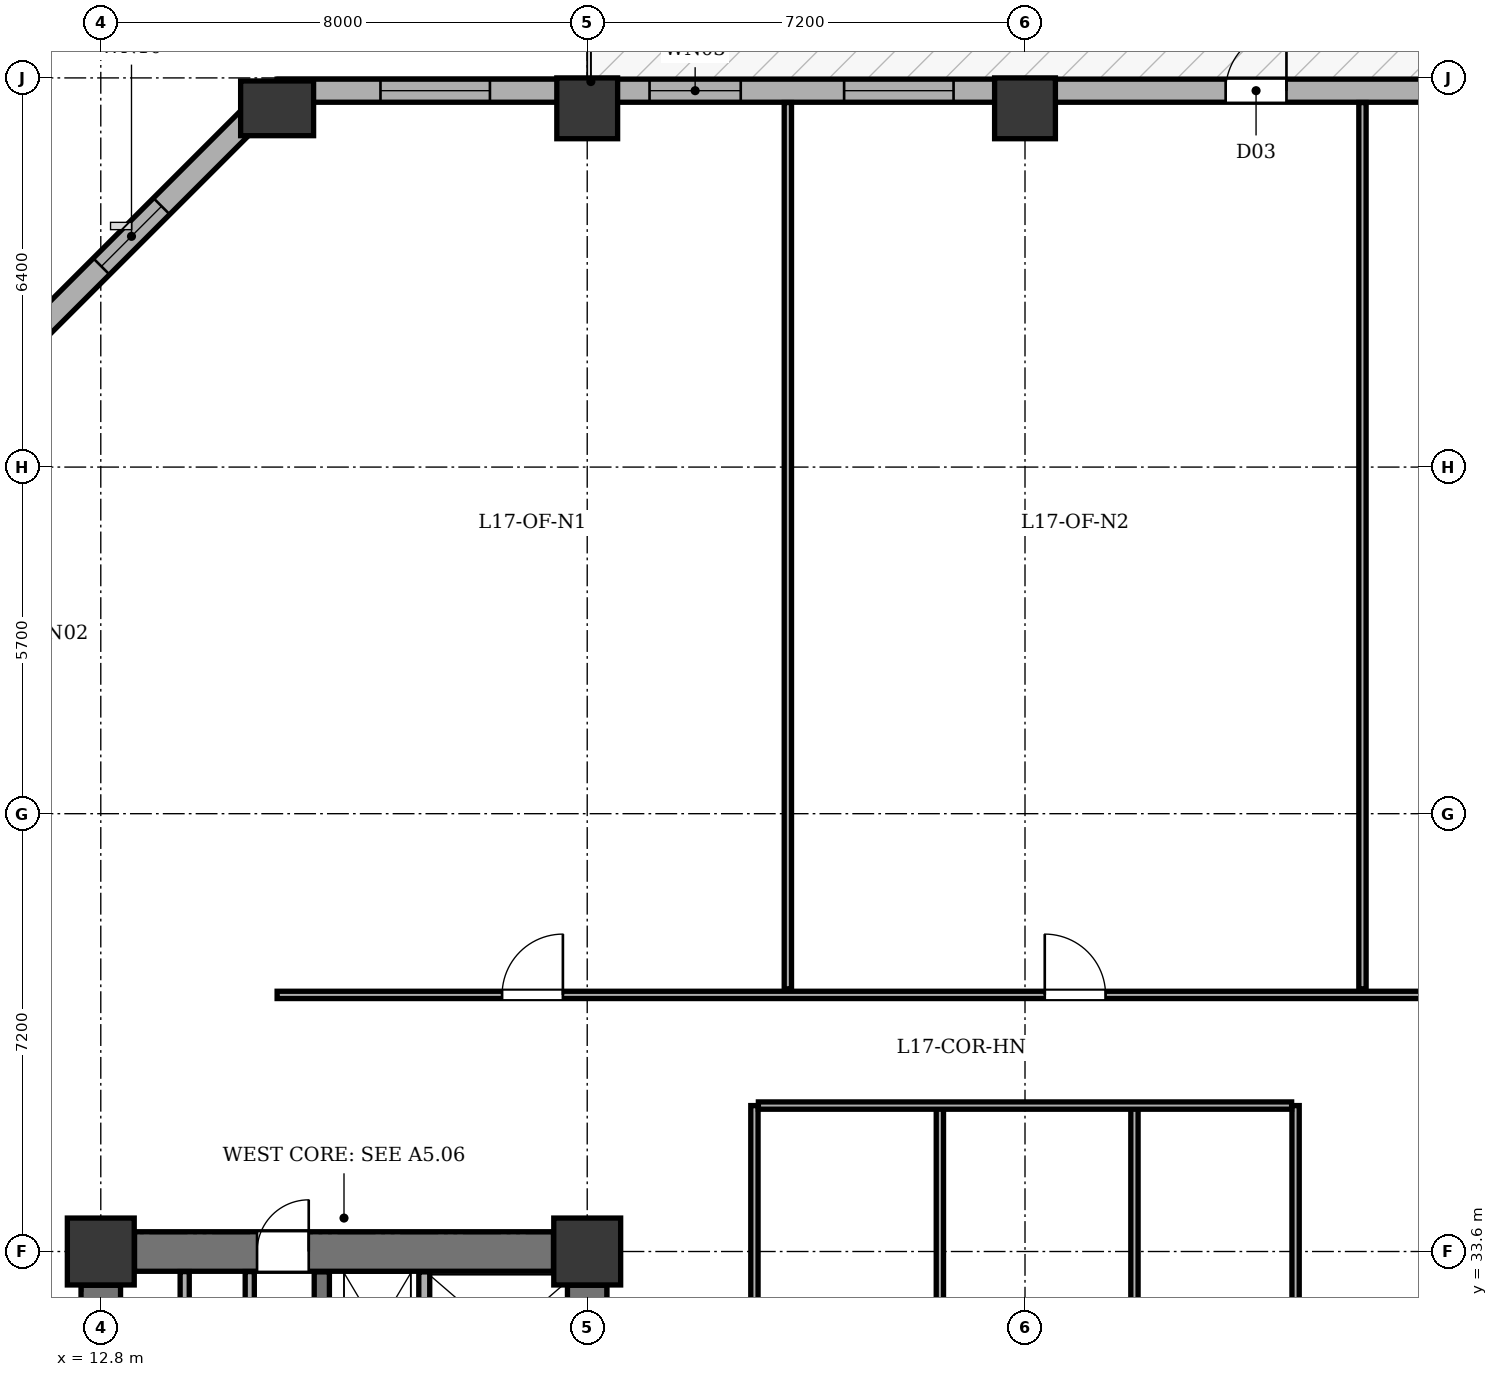
"""IFC4 building model, lengths in metres.
Left out: names, types, materials, properties, quantities, classifications, styles, units other than length and angle.
Written with IfcOpenShell. Run it as: python <this file> out.ifc"""

import sys

from ifc_helpers import new_model, si_unit, direction, frame, frame_2d, origin, origin_2d, place, context, subcontext, project, spatial, rectangle, extrude, element, fill, save


model = new_model("IFC4")
c1 = context("Model", 3, precision=1e-05, world=origin(), true_north=direction((0.0, 1.0)))
c2 = subcontext(c1, "Body", "Model", "MODEL_VIEW")
j1 = project(units=[si_unit("LENGTHUNIT", "METRE"), si_unit("PLANEANGLEUNIT", "RADIAN")], contexts=[c1])
p1 = place(None, origin())
s1 = spatial("IfcSite", under=j1, at=p1, CompositionType="ELEMENT")
p2 = place(p1, origin())
s2 = spatial("IfcBuilding", under=s1, at=p2, CompositionType="ELEMENT")
p3 = place(p2, frame((0.0, 0.0, 71.1)))
s3 = spatial("IfcBuildingStorey", under=s2, at=p3, CompositionType="ELEMENT", Elevation=71.1)
for number, where, z_axis, x_axis in (
    (1, (12.8, 33.6, 0.0), (0.0, 0.0, 1.0), (1.0, 0.0, 0.0)),
    (2, (20.8, 33.6, 0.0), (0.0, 0.0, 1.0), (1.0, 0.0, 0.0)),
):
    element("IfcColumn", number, at=place(p3, frame(where, z_axis=z_axis, x_axis=x_axis)), inside=s3, PredefinedType="COLUMN", context=c2, shape_type="SweptSolid", body=[
        extrude(rectangle(XDim=1.1, YDim=1.1, at=origin_2d()), origin(), (0.0, 0.0, 1.0), 3.9),
    ])
p4 = place(p3, frame((15.7, 52.4, 0.0), z_axis=(0.0, 0.0, 1.0), x_axis=(1.0, 0.0, 0.0)))
e3 = element("IfcColumn", 3, at=p4, inside=s3, PredefinedType="COLUMN", context=c2, shape_type="SweptSolid", body=[
    extrude(rectangle(XDim=0.9, YDim=1.2, at=origin_2d()), origin(), (0.0, 0.0, 1.0), 3.9),
])
for number, where, z_axis, x_axis in (
    (4, (20.8, 52.4, 0.0), (0.0, 0.0, 1.0), (1.0, 0.0, 0.0)),
    (5, (28.0, 52.4, 0.0), (0.0, 0.0, 1.0), (1.0, 0.0, 0.0)),
):
    element("IfcColumn", number, at=place(p3, frame(where, z_axis=z_axis, x_axis=x_axis)), inside=s3, PredefinedType="COLUMN", context=c2, shape_type="SweptSolid", body=[
        extrude(rectangle(XDim=1.0, YDim=1.0, at=origin_2d()), origin(), (0.0, 0.0, 1.0), 3.9),
    ])
p5 = place(p3, frame((10.91, 47.9, 0.0), z_axis=(0.0, 0.0, 1.0), x_axis=(0.707106781187, 0.707106781187, 0.0)))
e6 = element("IfcWall", 6, at=p5, inside=s3, PredefinedType="STANDARD", context=c2, shape_type="SweptSolid", body=[
    extrude(rectangle(XDim=6.774, YDim=0.38, at=frame_2d((3.387, 0.0))), origin(), (0.0, 0.0, 1.0), 3.135),
])
p6 = place(p5, frame((2.687, 0.0, 0.8)))
e7 = element("IfcOpeningElement", 7, at=p6, cuts=e6, PredefinedType="OPENING", context=c2, shape_type="SweptSolid", body=[
    extrude(rectangle(XDim=1.4, YDim=1.65, at=frame_2d((0.7, 0.825))), frame((0.0, 0.2, 0.0), z_axis=(0.0, -1.0, 0.0), x_axis=(1.0, 0.0, 0.0)), (0.0, 0.0, 1.0), 0.4),
])
p7 = place(p3, frame((15.7, 52.69, 0.0), z_axis=(0.0, 0.0, 1.0), x_axis=(1.0, 0.0, 0.0)))
e8 = element("IfcWall", 8, at=p7, inside=s3, PredefinedType="STANDARD", context=c2, shape_type="SweptSolid", body=[
    extrude(rectangle(XDim=35.0, YDim=0.38, at=frame_2d((17.5, 0.0))), origin(), (0.0, 0.0, 1.0), 3.135),
])
p8 = place(p7, frame((15.6, 0.0, 0.0)))
e9 = element("IfcOpeningElement", 9, at=p8, cuts=e8, PredefinedType="OPENING", context=c2, shape_type="SweptSolid", body=[
    extrude(rectangle(XDim=1.0, YDim=2.02, at=frame_2d((0.5, 1.01))), frame((0.0, 0.2, 0.0), z_axis=(0.0, -1.0, 0.0), x_axis=(1.0, 0.0, 0.0)), (0.0, 0.0, 1.0), 0.4),
])
p9 = place(p7, frame((1.7, 0.0, 0.8)))
e10 = element("IfcOpeningElement", 10, at=p9, cuts=e8, PredefinedType="OPENING", context=c2, shape_type="SweptSolid", body=[
    extrude(rectangle(XDim=1.8, YDim=1.9, at=frame_2d((0.9, 0.95))), frame((0.0, 0.2, 0.0), z_axis=(0.0, -1.0, 0.0), x_axis=(1.0, 0.0, 0.0)), (0.0, 0.0, 1.0), 0.4),
])
p10 = place(p7, frame((6.125, 0.0, 0.8)))
e11 = element("IfcOpeningElement", 11, at=p10, cuts=e8, PredefinedType="OPENING", context=c2, shape_type="SweptSolid", body=[
    extrude(rectangle(XDim=1.5, YDim=1.9, at=frame_2d((0.75, 0.95))), frame((0.0, 0.2, 0.0), z_axis=(0.0, -1.0, 0.0), x_axis=(1.0, 0.0, 0.0)), (0.0, 0.0, 1.0), 0.4),
])
p11 = place(p7, frame((9.325, 0.0, 0.8)))
e12 = element("IfcOpeningElement", 12, at=p11, cuts=e8, PredefinedType="OPENING", context=c2, shape_type="SweptSolid", body=[
    extrude(rectangle(XDim=1.8, YDim=1.9, at=frame_2d((0.9, 0.95))), frame((0.0, 0.2, 0.0), z_axis=(0.0, -1.0, 0.0), x_axis=(1.0, 0.0, 0.0)), (0.0, 0.0, 1.0), 0.4),
])
p12 = place(p7, frame((20.962, 0.0, 0.8)))
e13 = element("IfcOpeningElement", 13, at=p12, cuts=e8, PredefinedType="OPENING", context=c2, shape_type="SweptSolid", body=[
    extrude(rectangle(XDim=1.8, YDim=1.9, at=frame_2d((0.9, 0.95))), frame((0.0, 0.2, 0.0), z_axis=(0.0, -1.0, 0.0), x_axis=(1.0, 0.0, 0.0)), (0.0, 0.0, 1.0), 0.4),
])
p13 = place(p7, frame((23.938, 0.0, 0.8)))
e14 = element("IfcOpeningElement", 14, at=p13, cuts=e8, PredefinedType="OPENING", context=c2, shape_type="SweptSolid", body=[
    extrude(rectangle(XDim=1.8, YDim=1.9, at=frame_2d((0.9, 0.95))), frame((0.0, 0.2, 0.0), z_axis=(0.0, -1.0, 0.0), x_axis=(1.0, 0.0, 0.0)), (0.0, 0.0, 1.0), 0.4),
])
p14 = place(p7, frame((28.292, 0.0, 0.8)))
e15 = element("IfcOpeningElement", 15, at=p14, cuts=e8, PredefinedType="OPENING", context=c2, shape_type="SweptSolid", body=[
    extrude(rectangle(XDim=1.8, YDim=1.9, at=frame_2d((0.9, 0.95))), frame((0.0, 0.2, 0.0), z_axis=(0.0, -1.0, 0.0), x_axis=(1.0, 0.0, 0.0)), (0.0, 0.0, 1.0), 0.4),
])
p15 = place(p7, frame((31.508, 0.0, 0.8)))
e16 = element("IfcOpeningElement", 16, at=p15, cuts=e8, PredefinedType="OPENING", context=c2, shape_type="SweptSolid", body=[
    extrude(rectangle(XDim=1.8, YDim=1.9, at=frame_2d((0.9, 0.95))), frame((0.0, 0.2, 0.0), z_axis=(0.0, -1.0, 0.0), x_axis=(1.0, 0.0, 0.0)), (0.0, 0.0, 1.0), 0.4),
])
p16 = place(p3, frame((12.8, 21.355, 0.0), z_axis=(0.0, 0.0, 1.0), x_axis=(0.0, 1.0, 0.0)))
e17 = element("IfcWall", 17, at=p16, inside=s3, PredefinedType="SHEAR", context=c2, shape_type="SweptSolid", body=[
    extrude(rectangle(XDim=11.69, YDim=0.65, at=frame_2d((5.845, 0.0))), origin(), (0.0, 0.0, 1.0), 3.6),
])
p17 = place(p3, frame((13.355, 33.6, 0.0), z_axis=(0.0, 0.0, 1.0), x_axis=(1.0, 0.0, 0.0)))
e18 = element("IfcWall", 18, at=p17, inside=s3, PredefinedType="SHEAR", context=c2, shape_type="SweptSolid", body=[
    extrude(rectangle(XDim=6.89, YDim=0.65, at=frame_2d((3.445, 0.0))), origin(), (0.0, 0.0, 1.0), 3.6),
])
p18 = place(p17, frame((2.015, 0.0, 0.0)))
e19 = element("IfcOpeningElement", 19, at=p18, cuts=e18, PredefinedType="OPENING", context=c2, shape_type="SweptSolid", body=[
    extrude(rectangle(XDim=0.85, YDim=2.02, at=frame_2d((0.425, 1.01))), frame((0.0, 0.335, 0.0), z_axis=(0.0, -1.0, 0.0), x_axis=(1.0, 0.0, 0.0)), (0.0, 0.0, 1.0), 0.67),
])
p19 = place(p3, frame((20.8, 21.355, 0.0), z_axis=(0.0, 0.0, 1.0), x_axis=(0.0, 1.0, 0.0)))
e20 = element("IfcWall", 20, at=p19, inside=s3, PredefinedType="SHEAR", context=c2, shape_type="SweptSolid", body=[
    extrude(rectangle(XDim=11.69, YDim=0.65, at=frame_2d((5.845, 0.0))), origin(), (0.0, 0.0, 1.0), 3.6),
])
p20 = place(p19, frame((1.245, 0.0, 0.0)))
e21 = element("IfcOpeningElement", 21, at=p20, cuts=e20, PredefinedType="OPENING", context=c2, shape_type="SweptSolid", body=[
    extrude(rectangle(XDim=1.2, YDim=2.15, at=frame_2d((0.6, 1.075))), frame((0.0, 0.335, 0.0), z_axis=(0.0, -1.0, 0.0), x_axis=(1.0, 0.0, 0.0)), (0.0, 0.0, 1.0), 0.67),
])
p21 = place(p19, frame((4.245, 0.0, 0.0)))
e22 = element("IfcOpeningElement", 22, at=p21, cuts=e20, PredefinedType="OPENING", context=c2, shape_type="SweptSolid", body=[
    extrude(rectangle(XDim=1.1, YDim=2.1, at=frame_2d((0.55, 1.05))), frame((0.0, 0.335, 0.0), z_axis=(0.0, -1.0, 0.0), x_axis=(1.0, 0.0, 0.0)), (0.0, 0.0, 1.0), 0.67),
])
p22 = place(p19, frame((6.195, 0.0, 0.0)))
e23 = element("IfcOpeningElement", 23, at=p22, cuts=e20, PredefinedType="OPENING", context=c2, shape_type="SweptSolid", body=[
    extrude(rectangle(XDim=1.1, YDim=2.1, at=frame_2d((0.55, 1.05))), frame((0.0, 0.335, 0.0), z_axis=(0.0, -1.0, 0.0), x_axis=(1.0, 0.0, 0.0)), (0.0, 0.0, 1.0), 0.67),
])
p23 = place(p19, frame((8.145, 0.0, 0.0)))
e24 = element("IfcOpeningElement", 24, at=p23, cuts=e20, PredefinedType="OPENING", context=c2, shape_type="SweptSolid", body=[
    extrude(rectangle(XDim=1.1, YDim=2.1, at=frame_2d((0.55, 1.05))), frame((0.0, 0.335, 0.0), z_axis=(0.0, -1.0, 0.0), x_axis=(1.0, 0.0, 0.0)), (0.0, 0.0, 1.0), 0.67),
])
p24 = place(p3, frame((16.435, 21.135, 0.0), z_axis=(0.0, 0.0, 1.0), x_axis=(0.0, 1.0, 0.0)))
e25 = element("IfcWall", 25, at=p24, inside=s3, PredefinedType="SHEAR", context=c2, shape_type="SweptSolid", body=[
    extrude(rectangle(XDim=12.13, YDim=0.25, at=frame_2d((6.065, 0.0))), origin(), (0.0, 0.0, 1.0), 3.6),
])
p25 = place(p24, frame((0.515, 0.0, 0.0)))
e26 = element("IfcOpeningElement", 26, at=p25, cuts=e25, PredefinedType="OPENING", context=c2, shape_type="SweptSolid", body=[
    extrude(rectangle(XDim=1.2, YDim=2.15, at=frame_2d((0.6, 1.075))), frame((0.0, 0.135, 0.0), z_axis=(0.0, -1.0, 0.0), x_axis=(1.0, 0.0, 0.0)), (0.0, 0.0, 1.0), 0.27),
])
p26 = place(p24, frame((2.665, 0.0, 0.0)))
e27 = element("IfcOpeningElement", 27, at=p26, cuts=e25, PredefinedType="OPENING", context=c2, shape_type="SweptSolid", body=[
    extrude(rectangle(XDim=1.15, YDim=2.15, at=frame_2d((0.575, 1.075))), frame((0.0, 0.135, 0.0), z_axis=(0.0, -1.0, 0.0), x_axis=(1.0, 0.0, 0.0)), (0.0, 0.0, 1.0), 0.27),
])
p27 = place(p3, frame((18.12, 31.17, 0.0), z_axis=(0.0, 0.0, 1.0), x_axis=(0.0, 1.0, 0.0)))
e28 = element("IfcWall", 28, at=p27, inside=s3, PredefinedType="PARTITIONING", context=c2, shape_type="SweptSolid", body=[
    extrude(rectangle(XDim=2.095, YDim=0.18, at=frame_2d((1.047, 0.0))), origin(), (0.0, 0.0, 1.0), 3.6),
])
p28 = place(p3, frame((14.18, 30.96, 0.0), z_axis=(0.0, 0.0, 1.0), x_axis=(0.0, 1.0, 0.0)))
e29 = element("IfcWall", 29, at=p28, inside=s3, PredefinedType="PARTITIONING", context=c2, shape_type="SweptSolid", body=[
    extrude(rectangle(XDim=2.31, YDim=0.15, at=frame_2d((1.155, 0.0))), origin(), (0.0, 0.0, 1.0), 3.6),
])
p29 = place(p28, frame((0.47, 0.0, 0.0)))
e30 = element("IfcOpeningElement", 30, at=p29, cuts=e29, PredefinedType="OPENING", context=c2, shape_type="SweptSolid", body=[
    extrude(rectangle(XDim=0.85, YDim=2.02, at=frame_2d((0.425, 1.01))), frame((0.0, 0.085, 0.0), z_axis=(0.0, -1.0, 0.0), x_axis=(1.0, 0.0, 0.0)), (0.0, 0.0, 1.0), 0.17),
])
p30 = place(p3, frame((15.25, 30.96, 0.0), z_axis=(0.0, 0.0, 1.0), x_axis=(0.0, 1.0, 0.0)))
e31 = element("IfcWall", 31, at=p30, inside=s3, PredefinedType="PARTITIONING", context=c2, shape_type="SweptSolid", body=[
    extrude(rectangle(XDim=2.31, YDim=0.15, at=frame_2d((1.155, 0.0))), origin(), (0.0, 0.0, 1.0), 3.6),
])
p31 = place(p30, frame((0.47, 0.0, 0.0)))
e32 = element("IfcOpeningElement", 32, at=p31, cuts=e31, PredefinedType="OPENING", context=c2, shape_type="SweptSolid", body=[
    extrude(rectangle(XDim=0.85, YDim=2.02, at=frame_2d((0.425, 1.01))), frame((0.0, 0.085, 0.0), z_axis=(0.0, -1.0, 0.0), x_axis=(1.0, 0.0, 0.0)), (0.0, 0.0, 1.0), 0.17),
])
for number, where, z_axis, x_axis in (
    (33, (23.55, 24.715, 0.0), (0.0, 0.0, 1.0), (0.0, 1.0, 0.0)),
    (34, (32.45, 24.715, 0.0), (0.0, 0.0, 1.0), (0.0, 1.0, 0.0)),
    (35, (26.6, 24.715, 0.0), (0.0, 0.0, 1.0), (0.0, 1.0, 0.0)),
):
    element("IfcWall", number, at=place(p3, frame(where, z_axis=z_axis, x_axis=x_axis)), inside=s3, PredefinedType="PARTITIONING", context=c2, shape_type="SweptSolid", body=[
        extrude(rectangle(XDim=11.285, YDim=0.12, at=frame_2d((5.643, 0.0))), origin(), (0.0, 0.0, 1.0), 3.6),
    ])
p32 = place(p3, frame((29.8, 24.715, 0.0), z_axis=(0.0, 0.0, 1.0), x_axis=(0.0, 1.0, 0.0)))
e36 = element("IfcWall", 36, at=p32, inside=s3, PredefinedType="PARTITIONING", context=c2, shape_type="SweptSolid", body=[
    extrude(rectangle(XDim=11.285, YDim=0.12, at=frame_2d((5.643, 0.0))), origin(), (0.0, 0.0, 1.0), 3.135),
])
p33 = place(p3, frame((23.615, 36.0, 0.0), z_axis=(0.0, 0.0, 1.0), x_axis=(1.0, 0.0, 0.0)))
e37 = element("IfcWall", 37, at=p33, inside=s3, PredefinedType="PARTITIONING", context=c2, shape_type="SweptSolid", body=[
    extrude(rectangle(XDim=8.77, YDim=0.12, at=frame_2d((4.385, 0.0))), origin(), (0.0, 0.0, 1.0), 3.6),
])
p34 = place(p3, frame((15.7, 37.82, 0.0), z_axis=(0.0, 0.0, 1.0), x_axis=(1.0, 0.0, 0.0)))
e38 = element("IfcWall", 38, at=p34, inside=s3, PredefinedType="PARTITIONING", context=c2, shape_type="SweptSolid", body=[
    extrude(rectangle(XDim=35.0, YDim=0.12, at=frame_2d((17.5, 0.0))), origin(), (0.0, 0.0, 1.0), 3.6),
])
p35 = place(p34, frame((3.7, 0.0, 0.0)))
e39 = element("IfcOpeningElement", 39, at=p35, cuts=e38, PredefinedType="OPENING", context=c2, shape_type="SweptSolid", body=[
    extrude(rectangle(XDim=1.0, YDim=2.1, at=frame_2d((0.5, 1.05))), frame((0.0, 0.07, 0.0), z_axis=(0.0, -1.0, 0.0), x_axis=(1.0, 0.0, 0.0)), (0.0, 0.0, 1.0), 0.14),
])
p36 = place(p34, frame((12.625, 0.0, 0.0)))
e40 = element("IfcOpeningElement", 40, at=p36, cuts=e38, PredefinedType="OPENING", context=c2, shape_type="SweptSolid", body=[
    extrude(rectangle(XDim=1.0, YDim=2.1, at=frame_2d((0.5, 1.05))), frame((0.0, 0.07, 0.0), z_axis=(0.0, -1.0, 0.0), x_axis=(1.0, 0.0, 0.0)), (0.0, 0.0, 1.0), 0.14),
])
p37 = place(p34, frame((21.9, 0.0, 0.0)))
e41 = element("IfcOpeningElement", 41, at=p37, cuts=e38, PredefinedType="OPENING", context=c2, shape_type="SweptSolid", body=[
    extrude(rectangle(XDim=1.0, YDim=2.1, at=frame_2d((0.5, 1.05))), frame((0.0, 0.07, 0.0), z_axis=(0.0, -1.0, 0.0), x_axis=(1.0, 0.0, 0.0)), (0.0, 0.0, 1.0), 0.14),
])
p38 = place(p34, frame((30.475, 0.0, 0.0)))
e42 = element("IfcOpeningElement", 42, at=p38, cuts=e38, PredefinedType="OPENING", context=c2, shape_type="SweptSolid", body=[
    extrude(rectangle(XDim=1.0, YDim=2.1, at=frame_2d((0.5, 1.05))), frame((0.0, 0.07, 0.0), z_axis=(0.0, -1.0, 0.0), x_axis=(1.0, 0.0, 0.0)), (0.0, 0.0, 1.0), 0.14),
])
for number, where, z_axis, x_axis in (
    (43, (24.1, 37.92, 0.0), (0.0, 0.0, 1.0), (0.0, 1.0, 0.0)),
    (44, (33.55, 37.92, 0.0), (0.0, 0.0, 1.0), (0.0, 1.0, 0.0)),
):
    element("IfcWall", number, at=place(p3, frame(where, z_axis=z_axis, x_axis=x_axis)), inside=s3, PredefinedType="PARTITIONING", context=c2, shape_type="SweptSolid", body=[
        extrude(rectangle(XDim=14.575, YDim=0.12, at=frame_2d((7.288, 0.0))), origin(), (0.0, 0.0, 1.0), 3.135),
    ])
p39 = place(p8, origin())
e45 = element("IfcDoor", 45, at=p39, inside=s3, OperationType="SINGLE_SWING_RIGHT", PredefinedType="DOOR", context=c2, shape_type="SweptSolid", body=[
    extrude(rectangle(XDim=1.0, YDim=2.02, at=frame_2d((0.5, 1.01))), frame((0.0, 0.025, 0.0), z_axis=(0.0, -1.0, 0.0), x_axis=(1.0, 0.0, 0.0)), (0.0, 0.0, 1.0), 0.05),
])
fill(e9, e45)
p40 = place(p9, origin())
e46 = element("IfcWindow", 46, at=p40, inside=s3, PartitioningType="SINGLE_PANEL", PredefinedType="WINDOW", context=c2, shape_type="SweptSolid", body=[
    extrude(rectangle(XDim=1.8, YDim=1.9, at=frame_2d((0.9, 0.95))), frame((0.0, -0.01, 0.0), z_axis=(0.0, -1.0, 0.0), x_axis=(1.0, 0.0, 0.0)), (0.0, 0.0, 1.0), 0.06),
])
fill(e10, e46)
p41 = place(p10, origin())
e47 = element("IfcWindow", 47, at=p41, inside=s3, PartitioningType="SINGLE_PANEL", PredefinedType="WINDOW", context=c2, shape_type="SweptSolid", body=[
    extrude(rectangle(XDim=1.5, YDim=1.9, at=frame_2d((0.75, 0.95))), frame((0.0, -0.01, 0.0), z_axis=(0.0, -1.0, 0.0), x_axis=(1.0, 0.0, 0.0)), (0.0, 0.0, 1.0), 0.06),
])
fill(e11, e47)
p42 = place(p11, origin())
e48 = element("IfcWindow", 48, at=p42, inside=s3, PartitioningType="SINGLE_PANEL", PredefinedType="WINDOW", context=c2, shape_type="SweptSolid", body=[
    extrude(rectangle(XDim=1.8, YDim=1.9, at=frame_2d((0.9, 0.95))), frame((0.0, -0.01, 0.0), z_axis=(0.0, -1.0, 0.0), x_axis=(1.0, 0.0, 0.0)), (0.0, 0.0, 1.0), 0.06),
])
fill(e12, e48)
p43 = place(p6, origin())
e49 = element("IfcWindow", 49, at=p43, inside=s3, PartitioningType="SINGLE_PANEL", PredefinedType="WINDOW", context=c2, shape_type="SweptSolid", body=[
    extrude(rectangle(XDim=1.4, YDim=1.65, at=frame_2d((0.7, 0.825))), frame((0.0, -0.01, 0.0), z_axis=(0.0, -1.0, 0.0), x_axis=(1.0, 0.0, 0.0)), (0.0, 0.0, 1.0), 0.06),
])
fill(e7, e49)
p44 = place(p18, origin())
e50 = element("IfcDoor", 50, at=p44, inside=s3, OperationType="SINGLE_SWING_RIGHT", PredefinedType="DOOR", context=c2, shape_type="SweptSolid", body=[
    extrude(rectangle(XDim=0.85, YDim=2.02, at=frame_2d((0.425, 1.01))), frame((0.0, 0.025, 0.0), z_axis=(0.0, -1.0, 0.0), x_axis=(1.0, 0.0, 0.0)), (0.0, 0.0, 1.0), 0.05),
])
fill(e19, e50)
p45 = place(p35, origin())
e51 = element("IfcDoor", 51, at=p45, inside=s3, OperationType="SINGLE_SWING_RIGHT", PredefinedType="DOOR", context=c2, shape_type="SweptSolid", body=[
    extrude(rectangle(XDim=1.0, YDim=2.1, at=frame_2d((0.5, 1.05))), frame((0.0, 0.025, 0.0), z_axis=(0.0, -1.0, 0.0), x_axis=(1.0, 0.0, 0.0)), (0.0, 0.0, 1.0), 0.05),
])
fill(e39, e51)
p46 = place(p36, origin())
e52 = element("IfcDoor", 52, at=p46, inside=s3, OperationType="SINGLE_SWING_LEFT", PredefinedType="DOOR", context=c2, shape_type="SweptSolid", body=[
    extrude(rectangle(XDim=1.0, YDim=2.1, at=frame_2d((0.5, 1.05))), frame((0.0, 0.025, 0.0), z_axis=(0.0, -1.0, 0.0), x_axis=(1.0, 0.0, 0.0)), (0.0, 0.0, 1.0), 0.05),
])
fill(e40, e52)
save(model, sys.argv[1])
